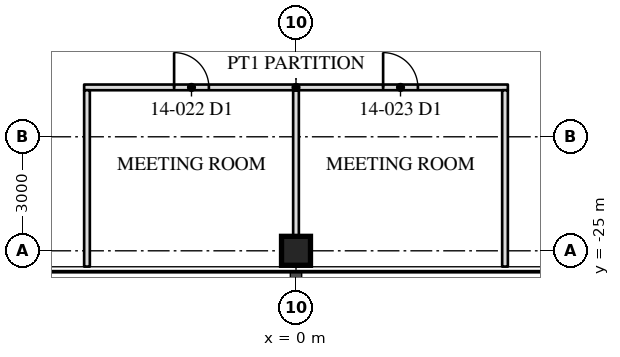
"""IFC4 building model, lengths in metres.
Left out: names, types, materials, properties, quantities, classifications, styles, units other than length and angle.
Written with IfcOpenShell. Run it as: python <this file> out.ifc"""

import sys

from ifc_helpers import new_model, si_unit, direction, frame, frame_2d, origin, origin_2d, place, context, subcontext, project, spatial, rectangle, hollow_rectangle, extrude, element, fill, save


model = new_model("IFC4")
c1 = context("Model", 3, precision=1e-05, world=origin(), true_north=direction((0.0, 1.0)))
c2 = subcontext(c1, "Body", "Model", "MODEL_VIEW")
j1 = project(units=[si_unit("LENGTHUNIT", "METRE"), si_unit("PLANEANGLEUNIT", "RADIAN")], contexts=[c1])
p1 = place(None, origin())
s1 = spatial("IfcSite", under=j1, at=p1, CompositionType="ELEMENT")
p2 = place(p1, origin())
s2 = spatial("IfcBuilding", under=s1, at=p2, CompositionType="ELEMENT")
p3 = place(p2, frame((0.0, 0.0, 61.1)))
s3 = spatial("IfcBuildingStorey", under=s2, at=p3, CompositionType="ELEMENT", Elevation=61.1)
p4 = place(p3, frame((0.0, -25.0, 0.0), z_axis=(0.0, 0.0, 1.0), x_axis=(1.0, 0.0, 0.0)))
e1 = element("IfcColumn", 1, at=p4, inside=s3, PredefinedType="COLUMN", context=c2, shape_type="SweptSolid", body=[
    extrude(hollow_rectangle(XDim=0.762, YDim=0.762, WallThickness=0.127, at=origin_2d()), origin(), (0.0, 0.0, 1.0), 4.1),
])
p5 = place(p3, frame((-5.575, -20.7, 0.0), z_axis=(0.0, 0.0, 1.0), x_axis=(1.0, 0.0, 0.0)))
e2 = element("IfcWall", 2, at=p5, inside=s3, PredefinedType="PARTITIONING", context=c2, shape_type="SweptSolid", body=[
    extrude(rectangle(XDim=11.15, YDim=0.15, at=frame_2d((5.575, 0.0))), origin(), (0.0, 0.0, 1.0), 3.91),
])
p6 = place(p5, frame((2.367, 0.0, 0.0)))
e3 = element("IfcOpeningElement", 3, at=p6, cuts=e2, PredefinedType="OPENING", context=c2, shape_type="SweptSolid", body=[
    extrude(rectangle(XDim=0.915, YDim=2.134, at=frame_2d((0.458, 1.067))), frame((0.0, 0.085, 0.0), z_axis=(0.0, -1.0, 0.0), x_axis=(1.0, 0.0, 0.0)), (0.0, 0.0, 1.0), 0.17),
])
p7 = place(p5, frame((7.867, 0.0, 0.0)))
e4 = element("IfcOpeningElement", 4, at=p7, cuts=e2, PredefinedType="OPENING", context=c2, shape_type="SweptSolid", body=[
    extrude(rectangle(XDim=0.915, YDim=2.134, at=frame_2d((0.458, 1.067))), frame((0.0, 0.085, 0.0), z_axis=(0.0, -1.0, 0.0), x_axis=(1.0, 0.0, 0.0)), (0.0, 0.0, 1.0), 0.17),
])
p8 = place(p3, frame((-5.5, -20.775, 0.0), z_axis=(0.0, 0.0, 1.0), x_axis=(0.0, -1.0, 0.0)))
e5 = element("IfcWall", 5, at=p8, inside=s3, PredefinedType="PARTITIONING", context=c2, shape_type="SweptSolid", body=[
    extrude(rectangle(XDim=4.64, YDim=0.15, at=frame_2d((2.32, 0.0))), origin(), (0.0, 0.0, 1.0), 3.91),
])
p9 = place(p3, frame((0.0, -20.775, 0.0), z_axis=(0.0, 0.0, 1.0), x_axis=(0.0, -1.0, 0.0)))
e6 = element("IfcWall", 6, at=p9, inside=s3, PredefinedType="PARTITIONING", context=c2, shape_type="SweptSolid", body=[
    extrude(rectangle(XDim=4.64, YDim=0.15, at=frame_2d((2.32, 0.0))), origin(), (0.0, 0.0, 1.0), 3.13),
])
p10 = place(p3, frame((5.5, -20.775, 0.0), z_axis=(0.0, 0.0, 1.0), x_axis=(0.0, -1.0, 0.0)))
e7 = element("IfcWall", 7, at=p10, inside=s3, PredefinedType="PARTITIONING", context=c2, shape_type="SweptSolid", body=[
    extrude(rectangle(XDim=4.64, YDim=0.15, at=frame_2d((2.32, 0.0))), origin(), (0.0, 0.0, 1.0), 3.91),
])
p11 = place(p6, origin())
e8 = element("IfcDoor", 8, at=p11, inside=s3, OperationType="SINGLE_SWING_LEFT", PredefinedType="DOOR", context=c2, shape_type="SweptSolid", body=[
    extrude(rectangle(XDim=0.915, YDim=2.134, at=frame_2d((0.458, 1.067))), frame((0.0, 0.025, 0.0), z_axis=(0.0, -1.0, 0.0), x_axis=(1.0, 0.0, 0.0)), (0.0, 0.0, 1.0), 0.05),
])
fill(e3, e8)
p12 = place(p7, origin())
e9 = element("IfcDoor", 9, at=p12, inside=s3, OperationType="SINGLE_SWING_LEFT", PredefinedType="DOOR", context=c2, shape_type="SweptSolid", body=[
    extrude(rectangle(XDim=0.915, YDim=2.134, at=frame_2d((0.458, 1.067))), frame((0.0, 0.025, 0.0), z_axis=(0.0, -1.0, 0.0), x_axis=(1.0, 0.0, 0.0)), (0.0, 0.0, 1.0), 0.05),
])
fill(e4, e9)
save(model, sys.argv[1])
